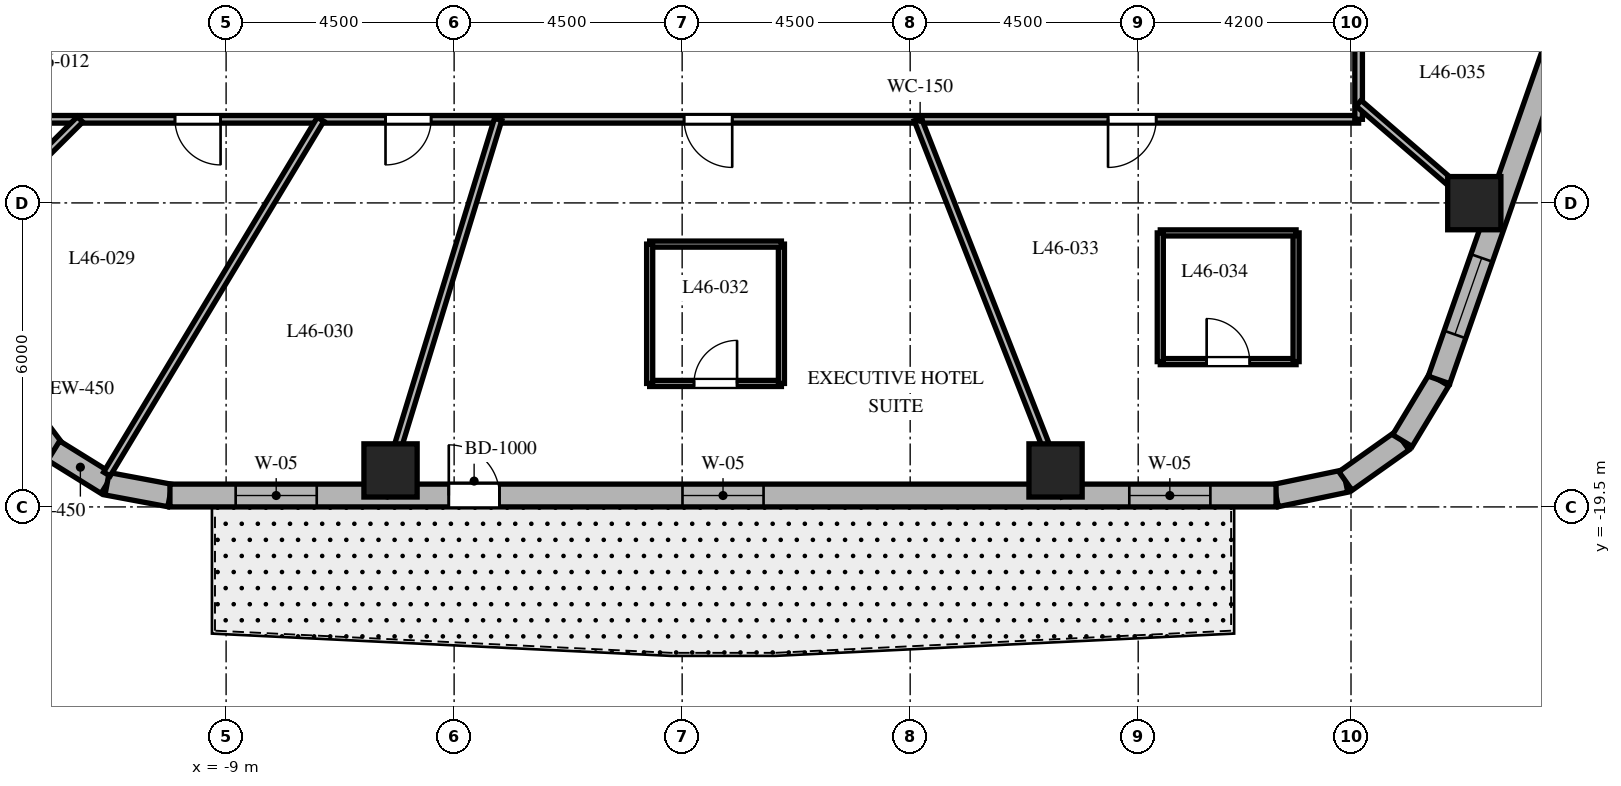
"""IFC4 building model, lengths in metres.
Left out: names, types, materials, properties, quantities, classifications, styles, units other than length and angle.
Written with IfcOpenShell. Run it as: python <this file> out.ifc"""

import sys

from ifc_helpers import new_model, si_unit, direction, frame, frame_2d, origin, origin_2d, place, context, subcontext, project, spatial, rectangle, extrude, element, fill, save


model = new_model("IFC4")
c1 = context("Model", 3, precision=1e-05, world=origin(), true_north=direction((0.0, 1.0)))
c2 = subcontext(c1, "Body", "Model", "MODEL_VIEW")
j1 = project(units=[si_unit("LENGTHUNIT", "METRE"), si_unit("PLANEANGLEUNIT", "RADIAN")], contexts=[c1])
p1 = place(None, origin())
s1 = spatial("IfcSite", under=j1, at=p1, CompositionType="ELEMENT")
p2 = place(p1, origin())
s2 = spatial("IfcBuilding", under=s1, at=p2, CompositionType="ELEMENT")
p3 = place(p2, frame((0.0, 0.0, 186.7)))
s3 = spatial("IfcBuildingStorey", under=s2, at=p3, CompositionType="ELEMENT", Elevation=186.7)
for number, where, z_axis, x_axis in (
    (1, (-5.755, -18.78, 0.0), (0.0, 0.0, 1.0), (1.0, 0.0, 0.0)),
    (2, (7.369, -18.78, 0.0), (0.0, 0.0, 1.0), (1.0, 0.0, 0.0)),
    (3, (15.633, -13.505, 0.0), (0.0, 0.0, 1.0), (1.0, 0.0, 0.0)),
):
    element("IfcColumn", number, at=place(p3, frame(where, z_axis=z_axis, x_axis=x_axis)), inside=s3, PredefinedType="COLUMN", context=c2, shape_type="SweptSolid", body=[
        extrude(rectangle(XDim=1.05, YDim=1.05, at=origin_2d()), origin(), (0.0, 0.0, 1.0), 3.7),
    ])
p4 = place(p3, frame((-13.162, -17.381, 0.0), z_axis=(0.0, 0.0, 1.0), x_axis=(0.601515770517, -0.798860925205, 0.0)))
e4 = element("IfcWall", 4, at=p4, inside=s3, PredefinedType="SOLIDWALL", context=c2, shape_type="SweptSolid", body=[
    extrude(rectangle(XDim=1.262, YDim=0.45, at=frame_2d((0.631, 0.0))), origin(), (0.0, 0.0, 1.0), 3.4),
])
p5 = place(p3, frame((-12.403, -18.389, 0.0), z_axis=(0.0, 0.0, 1.0), x_axis=(0.849795170926, -0.527113049991, 0.0)))
e5 = element("IfcWall", 5, at=p5, inside=s3, PredefinedType="SOLIDWALL", context=c2, shape_type="SweptSolid", body=[
    extrude(rectangle(XDim=1.241, YDim=0.45, at=frame_2d((0.62, 0.0))), origin(), (0.0, 0.0, 1.0), 3.4),
])
p6 = place(p3, frame((-11.349, -19.043, 0.0), z_axis=(0.0, 0.0, 1.0), x_axis=(0.982931267051, -0.183973161772, 0.0)))
e6 = element("IfcWall", 6, at=p6, inside=s3, PredefinedType="SOLIDWALL", context=c2, shape_type="SweptSolid", body=[
    extrude(rectangle(XDim=1.262, YDim=0.45, at=frame_2d((0.631, 0.0))), origin(), (0.0, 0.0, 1.0), 3.4),
])
p7 = place(p3, frame((11.72, -19.275, 0.0), z_axis=(0.0, 0.0, 1.0), x_axis=(0.97893106758, 0.204191001093, 0.0)))
e7 = element("IfcWall", 7, at=p7, inside=s3, PredefinedType="SOLIDWALL", context=c2, shape_type="SweptSolid", body=[
    extrude(rectangle(XDim=1.4, YDim=0.45, at=frame_2d((0.7, 0.0))), origin(), (0.0, 0.0, 1.0), 3.4),
])
p8 = place(p3, frame((13.091, -18.989, 0.0), z_axis=(0.0, 0.0, 1.0), x_axis=(0.815574637848, 0.578651890258, 0.0)))
e8 = element("IfcWall", 8, at=p8, inside=s3, PredefinedType="SOLIDWALL", context=c2, shape_type="SweptSolid", body=[
    extrude(rectangle(XDim=1.377, YDim=0.45, at=frame_2d((0.688, 0.0))), origin(), (0.0, 0.0, 1.0), 3.4),
])
p9 = place(p3, frame((14.214, -18.192, 0.0), z_axis=(0.0, 0.0, 1.0), x_axis=(0.516340945502, 0.856383108193, 0.0)))
e9 = element("IfcWall", 9, at=p9, inside=s3, PredefinedType="SOLIDWALL", context=c2, shape_type="SweptSolid", body=[
    extrude(rectangle(XDim=1.4, YDim=0.45, at=frame_2d((0.7, 0.0))), origin(), (0.0, 0.0, 1.0), 3.4),
])
p10 = place(p3, frame((-10.108, -19.275, 0.0), z_axis=(0.0, 0.0, 1.0), x_axis=(1.0, 0.0, 0.0)))
e10 = element("IfcWall", 10, at=p10, inside=s3, PredefinedType="SOLIDWALL", context=c2, shape_type="SweptSolid", body=[
    extrude(rectangle(XDim=21.829, YDim=0.45, at=frame_2d((10.915, 0.0))), origin(), (0.0, 0.0, 1.0), 3.4),
])
p11 = place(p10, frame((5.503, 0.0, 0.0)))
e11 = element("IfcOpeningElement", 11, at=p11, cuts=e10, PredefinedType="OPENING", context=c2, shape_type="SweptSolid", body=[
    extrude(rectangle(XDim=1.0, YDim=2.15, at=frame_2d((0.5, 1.075))), frame((0.0, 0.235, 0.0), z_axis=(0.0, -1.0, 0.0), x_axis=(1.0, 0.0, 0.0)), (0.0, 0.0, 1.0), 0.47),
])
p12 = place(p10, frame((1.297, 0.0, 0.8)))
e12 = element("IfcOpeningElement", 12, at=p12, cuts=e10, PredefinedType="OPENING", context=c2, shape_type="SweptSolid", body=[
    extrude(rectangle(XDim=1.6, YDim=1.75, at=frame_2d((0.8, 0.875))), frame((0.0, 0.235, 0.0), z_axis=(0.0, -1.0, 0.0), x_axis=(1.0, 0.0, 0.0)), (0.0, 0.0, 1.0), 0.47),
])
p13 = place(p10, frame((10.115, 0.0, 0.8)))
e13 = element("IfcOpeningElement", 13, at=p13, cuts=e10, PredefinedType="OPENING", context=c2, shape_type="SweptSolid", body=[
    extrude(rectangle(XDim=1.6, YDim=1.75, at=frame_2d((0.8, 0.875))), frame((0.0, 0.235, 0.0), z_axis=(0.0, -1.0, 0.0), x_axis=(1.0, 0.0, 0.0)), (0.0, 0.0, 1.0), 0.47),
])
p14 = place(p10, frame((18.933, 0.0, 0.8)))
e14 = element("IfcOpeningElement", 14, at=p14, cuts=e10, PredefinedType="OPENING", context=c2, shape_type="SweptSolid", body=[
    extrude(rectangle(XDim=1.6, YDim=1.75, at=frame_2d((0.8, 0.875))), frame((0.0, 0.235, 0.0), z_axis=(0.0, -1.0, 0.0), x_axis=(1.0, 0.0, 0.0)), (0.0, 0.0, 1.0), 0.47),
])
p15 = place(p3, frame((14.937, -16.993, 0.0), z_axis=(0.0, 0.0, 1.0), x_axis=(0.330431575061, 0.943829949834, 0.0)))
e15 = element("IfcWall", 15, at=p15, inside=s3, PredefinedType="SOLIDWALL", context=c2, shape_type="SweptSolid", body=[
    extrude(rectangle(XDim=17.689, YDim=0.45, at=frame_2d((8.844, 0.0))), origin(), (0.0, 0.0, 1.0), 3.4),
])
p16 = place(p15, frame((0.95, 0.0, 0.8)))
e16 = element("IfcOpeningElement", 16, at=p16, cuts=e15, PredefinedType="OPENING", context=c2, shape_type="SweptSolid", body=[
    extrude(rectangle(XDim=1.6, YDim=1.75, at=frame_2d((0.8, 0.875))), frame((0.0, 0.235, 0.0), z_axis=(0.0, -1.0, 0.0), x_axis=(1.0, 0.0, 0.0)), (0.0, 0.0, 1.0), 0.47),
])
p17 = place(p15, frame((7.99, 0.0, 0.8)))
e17 = element("IfcOpeningElement", 17, at=p17, cuts=e15, PredefinedType="OPENING", context=c2, shape_type="SweptSolid", body=[
    extrude(rectangle(XDim=1.6, YDim=1.75, at=frame_2d((0.8, 0.875))), frame((0.0, 0.235, 0.0), z_axis=(0.0, -1.0, 0.0), x_axis=(1.0, 0.0, 0.0)), (0.0, 0.0, 1.0), 0.47),
])
p18 = place(p15, frame((15.084, 0.0, 0.8)))
e18 = element("IfcOpeningElement", 18, at=p18, cuts=e15, PredefinedType="OPENING", context=c2, shape_type="SweptSolid", body=[
    extrude(rectangle(XDim=1.6, YDim=1.75, at=frame_2d((0.8, 0.875))), frame((0.0, 0.235, 0.0), z_axis=(0.0, -1.0, 0.0), x_axis=(1.0, 0.0, 0.0)), (0.0, 0.0, 1.0), 0.47),
])
p19 = place(p3, frame((13.35, -11.85, 0.0), z_axis=(0.0, 0.0, 1.0), x_axis=(-1.0, 0.0, 0.0)))
e19 = element("IfcWall", 19, at=p19, inside=s3, PredefinedType="PARTITIONING", context=c2, shape_type="SweptSolid", body=[
    extrude(rectangle(XDim=26.7, YDim=0.15, at=frame_2d((13.35, 0.0))), origin(), (0.0, 0.0, 1.0), 2.84),
])
p20 = place(p19, frame((22.459, 0.0, 0.0)))
e20 = element("IfcOpeningElement", 20, at=p20, cuts=e19, PredefinedType="OPENING", context=c2, shape_type="SweptSolid", body=[
    extrude(rectangle(XDim=0.9, YDim=2.03, at=frame_2d((0.45, 1.015))), frame((0.0, 0.085, 0.0), z_axis=(0.0, -1.0, 0.0), x_axis=(1.0, 0.0, 0.0)), (0.0, 0.0, 1.0), 0.17),
])
p21 = place(p19, frame((18.304, 0.0, 0.0)))
e21 = element("IfcOpeningElement", 21, at=p21, cuts=e19, PredefinedType="OPENING", context=c2, shape_type="SweptSolid", body=[
    extrude(rectangle(XDim=0.9, YDim=2.03, at=frame_2d((0.45, 1.015))), frame((0.0, 0.085, 0.0), z_axis=(0.0, -1.0, 0.0), x_axis=(1.0, 0.0, 0.0)), (0.0, 0.0, 1.0), 0.17),
])
p22 = place(p19, frame((12.362, 0.0, 0.0)))
e22 = element("IfcOpeningElement", 22, at=p22, cuts=e19, PredefinedType="OPENING", context=c2, shape_type="SweptSolid", body=[
    extrude(rectangle(XDim=0.95, YDim=2.03, at=frame_2d((0.475, 1.015))), frame((0.0, 0.085, 0.0), z_axis=(0.0, -1.0, 0.0), x_axis=(1.0, 0.0, 0.0)), (0.0, 0.0, 1.0), 0.17),
])
p23 = place(p19, frame((3.995, 0.0, 0.0)))
e23 = element("IfcOpeningElement", 23, at=p23, cuts=e19, PredefinedType="OPENING", context=c2, shape_type="SweptSolid", body=[
    extrude(rectangle(XDim=0.95, YDim=2.03, at=frame_2d((0.475, 1.015))), frame((0.0, 0.085, 0.0), z_axis=(0.0, -1.0, 0.0), x_axis=(1.0, 0.0, 0.0)), (0.0, 0.0, 1.0), 0.17),
])
p24 = place(p3, frame((13.35, 11.85, 0.0), z_axis=(0.0, 0.0, 1.0), x_axis=(0.0, -1.0, 0.0)))
e24 = element("IfcWall", 24, at=p24, inside=s3, PredefinedType="PARTITIONING", context=c2, shape_type="SweptSolid", body=[
    extrude(rectangle(XDim=23.7, YDim=0.15, at=frame_2d((11.85, 0.0))), origin(), (0.0, 0.0, 1.0), 2.84),
])
p25 = place(p24, frame((5.951, 0.0, 0.0)))
e25 = element("IfcOpeningElement", 25, at=p25, cuts=e24, PredefinedType="OPENING", context=c2, shape_type="SweptSolid", body=[
    extrude(rectangle(XDim=0.9, YDim=2.03, at=frame_2d((0.45, 1.015))), frame((0.0, 0.085, 0.0), z_axis=(0.0, -1.0, 0.0), x_axis=(1.0, 0.0, 0.0)), (0.0, 0.0, 1.0), 0.17),
])
p26 = place(p24, frame((1.993, 0.0, 0.0)))
e26 = element("IfcOpeningElement", 26, at=p26, cuts=e24, PredefinedType="OPENING", context=c2, shape_type="SweptSolid", body=[
    extrude(rectangle(XDim=0.9, YDim=2.03, at=frame_2d((0.45, 1.015))), frame((0.0, 0.085, 0.0), z_axis=(0.0, -1.0, 0.0), x_axis=(1.0, 0.0, 0.0)), (0.0, 0.0, 1.0), 0.17),
])
p27 = place(p24, frame((18.364, 0.0, 0.0)))
e27 = element("IfcOpeningElement", 27, at=p27, cuts=e24, PredefinedType="OPENING", context=c2, shape_type="SweptSolid", body=[
    extrude(rectangle(XDim=1.0, YDim=2.03, at=frame_2d((0.5, 1.015))), frame((0.0, 0.085, 0.0), z_axis=(0.0, -1.0, 0.0), x_axis=(1.0, 0.0, 0.0)), (0.0, 0.0, 1.0), 0.17),
])
p28 = place(p3, frame((-11.882, -11.85, 0.0), z_axis=(0.0, 0.0, 1.0), x_axis=(-0.708037373639, -0.706174962407, 0.0)))
e28 = element("IfcWall", 28, at=p28, inside=s3, PredefinedType="PARTITIONING", context=c2, shape_type="SweptSolid", body=[
    extrude(rectangle(XDim=3.802, YDim=0.15, at=frame_2d((1.901, 0.0))), origin(), (0.0, 0.0, 1.0), 2.64),
])
p29 = place(p3, frame((-7.136, -11.85, 0.0), z_axis=(0.0, 0.0, 1.0), x_axis=(-0.515900673207, -0.856648408266, 0.0)))
e29 = element("IfcWall", 29, at=p29, inside=s3, PredefinedType="PARTITIONING", context=c2, shape_type="SweptSolid", body=[
    extrude(rectangle(XDim=8.174, YDim=0.15, at=frame_2d((4.087, 0.0))), origin(), (0.0, 0.0, 1.0), 2.64),
])
p30 = place(p3, frame((-3.631, -11.85, 0.0), z_axis=(0.0, 0.0, 1.0), x_axis=(-0.293007573338, -0.956110120209, 0.0)))
e30 = element("IfcWall", 30, at=p30, inside=s3, PredefinedType="PARTITIONING", context=c2, shape_type="SweptSolid", body=[
    extrude(rectangle(XDim=7.766, YDim=0.15, at=frame_2d((3.883, 0.0))), origin(), (0.0, 0.0, 1.0), 2.64),
])
p31 = place(p3, frame((4.65, -11.85, 0.0), z_axis=(0.0, 0.0, 1.0), x_axis=(0.365265947993, -0.930903210456, 0.0)))
e31 = element("IfcWall", 31, at=p31, inside=s3, PredefinedType="PARTITIONING", context=c2, shape_type="SweptSolid", body=[
    extrude(rectangle(XDim=7.976, YDim=0.15, at=frame_2d((3.988, 0.0))), origin(), (0.0, 0.0, 1.0), 2.64),
])
p32 = place(p3, frame((13.35, -11.533, 0.0), z_axis=(0.0, 0.0, 1.0), x_axis=(0.756711647314, -0.65374879183, 0.0)))
e32 = element("IfcWall", 32, at=p32, inside=s3, PredefinedType="PARTITIONING", context=c2, shape_type="SweptSolid", body=[
    extrude(rectangle(XDim=3.55, YDim=0.15, at=frame_2d((1.775, 0.0))), origin(), (0.0, 0.0, 1.0), 2.64),
])
p33 = place(p3, frame((-0.641, -17.063, 0.0), z_axis=(0.0, 0.0, 1.0), x_axis=(1.0, 0.0, 0.0)))
e33 = element("IfcWall", 33, at=p33, inside=s3, PredefinedType="PARTITIONING", context=c2, shape_type="SweptSolid", body=[
    extrude(rectangle(XDim=2.6, YDim=0.12, at=frame_2d((1.3, 0.0))), origin(), (0.0, 0.0, 1.0), 3.4),
])
p34 = place(p33, frame((0.875, 0.0, 0.0)))
e34 = element("IfcOpeningElement", 34, at=p34, cuts=e33, PredefinedType="OPENING", context=c2, shape_type="SweptSolid", body=[
    extrude(rectangle(XDim=0.85, YDim=2.03, at=frame_2d((0.425, 1.015))), frame((0.0, 0.07, 0.0), z_axis=(0.0, -1.0, 0.0), x_axis=(1.0, 0.0, 0.0)), (0.0, 0.0, 1.0), 0.14),
])
p35 = place(p3, frame((1.959, -17.063, 0.0), z_axis=(0.0, 0.0, 1.0), x_axis=(0.0, 1.0, 0.0)))
e35 = element("IfcWall", 35, at=p35, inside=s3, PredefinedType="PARTITIONING", context=c2, shape_type="SweptSolid", body=[
    extrude(rectangle(XDim=2.75, YDim=0.12, at=frame_2d((1.375, 0.0))), origin(), (0.0, 0.0, 1.0), 2.84),
])
p36 = place(p3, frame((1.959, -14.313, 0.0), z_axis=(0.0, 0.0, 1.0), x_axis=(-1.0, 0.0, 0.0)))
e36 = element("IfcWall", 36, at=p36, inside=s3, PredefinedType="PARTITIONING", context=c2, shape_type="SweptSolid", body=[
    extrude(rectangle(XDim=2.6, YDim=0.12, at=frame_2d((1.3, 0.0))), origin(), (0.0, 0.0, 1.0), 3.4),
])
p37 = place(p3, frame((-0.641, -14.313, 0.0), z_axis=(0.0, 0.0, 1.0), x_axis=(0.0, -1.0, 0.0)))
e37 = element("IfcWall", 37, at=p37, inside=s3, PredefinedType="PARTITIONING", context=c2, shape_type="SweptSolid", body=[
    extrude(rectangle(XDim=2.75, YDim=0.12, at=frame_2d((1.375, 0.0))), origin(), (0.0, 0.0, 1.0), 2.84),
])
p38 = place(p3, frame((9.436, -16.632, 0.0), z_axis=(0.0, 0.0, 1.0), x_axis=(1.0, 0.0, 0.0)))
e38 = element("IfcWall", 38, at=p38, inside=s3, PredefinedType="PARTITIONING", context=c2, shape_type="SweptSolid", body=[
    extrude(rectangle(XDim=2.68, YDim=0.12, at=frame_2d((1.34, 0.0))), origin(), (0.0, 0.0, 1.0), 2.64),
])
p39 = place(p38, frame((0.915, 0.0, 0.0)))
e39 = element("IfcOpeningElement", 39, at=p39, cuts=e38, PredefinedType="OPENING", context=c2, shape_type="SweptSolid", body=[
    extrude(rectangle(XDim=0.85, YDim=2.03, at=frame_2d((0.425, 1.015))), frame((0.0, 0.07, 0.0), z_axis=(0.0, -1.0, 0.0), x_axis=(1.0, 0.0, 0.0)), (0.0, 0.0, 1.0), 0.14),
])
p40 = place(p3, frame((12.116, -16.632, 0.0), z_axis=(0.0, 0.0, 1.0), x_axis=(0.0, 1.0, 0.0)))
e40 = element("IfcWall", 40, at=p40, inside=s3, PredefinedType="PARTITIONING", context=c2, shape_type="SweptSolid", body=[
    extrude(rectangle(XDim=2.54, YDim=0.12, at=frame_2d((1.27, 0.0))), origin(), (0.0, 0.0, 1.0), 2.64),
])
p41 = place(p3, frame((12.116, -14.092, 0.0), z_axis=(0.0, 0.0, 1.0), x_axis=(-1.0, 0.0, 0.0)))
e41 = element("IfcWall", 41, at=p41, inside=s3, PredefinedType="PARTITIONING", context=c2, shape_type="SweptSolid", body=[
    extrude(rectangle(XDim=2.68, YDim=0.12, at=frame_2d((1.34, 0.0))), origin(), (0.0, 0.0, 1.0), 2.927),
])
p42 = place(p3, frame((9.436, -14.092, 0.0), z_axis=(0.0, 0.0, 1.0), x_axis=(0.0, -1.0, 0.0)))
e42 = element("IfcWall", 42, at=p42, inside=s3, PredefinedType="PARTITIONING", context=c2, shape_type="SweptSolid", body=[
    extrude(rectangle(XDim=2.54, YDim=0.12, at=frame_2d((1.27, 0.0))), origin(), (0.0, 0.0, 1.0), 2.927),
])
p43 = place(p11, origin())
e43 = element("IfcDoor", 43, at=p43, inside=s3, OperationType="SINGLE_SWING_LEFT", PredefinedType="DOOR", context=c2, shape_type="SweptSolid", body=[
    extrude(rectangle(XDim=1.0, YDim=2.15, at=frame_2d((0.5, 1.075))), frame((0.0, 0.025, 0.0), z_axis=(0.0, -1.0, 0.0), x_axis=(1.0, 0.0, 0.0)), (0.0, 0.0, 1.0), 0.05),
])
fill(e11, e43)
p44 = place(p12, origin())
e44 = element("IfcWindow", 44, at=p44, inside=s3, PartitioningType="SINGLE_PANEL", PredefinedType="WINDOW", context=c2, shape_type="SweptSolid", body=[
    extrude(rectangle(XDim=1.6, YDim=1.75, at=frame_2d((0.8, 0.875))), frame((0.0, 0.03, 0.0), z_axis=(0.0, -1.0, 0.0), x_axis=(1.0, 0.0, 0.0)), (0.0, 0.0, 1.0), 0.06),
])
fill(e12, e44)
p45 = place(p13, origin())
e45 = element("IfcWindow", 45, at=p45, inside=s3, PartitioningType="SINGLE_PANEL", PredefinedType="WINDOW", context=c2, shape_type="SweptSolid", body=[
    extrude(rectangle(XDim=1.6, YDim=1.75, at=frame_2d((0.8, 0.875))), frame((0.0, 0.03, 0.0), z_axis=(0.0, -1.0, 0.0), x_axis=(1.0, 0.0, 0.0)), (0.0, 0.0, 1.0), 0.06),
])
fill(e13, e45)
p46 = place(p14, origin())
e46 = element("IfcWindow", 46, at=p46, inside=s3, PartitioningType="SINGLE_PANEL", PredefinedType="WINDOW", context=c2, shape_type="SweptSolid", body=[
    extrude(rectangle(XDim=1.6, YDim=1.75, at=frame_2d((0.8, 0.875))), frame((0.0, 0.03, 0.0), z_axis=(0.0, -1.0, 0.0), x_axis=(1.0, 0.0, 0.0)), (0.0, 0.0, 1.0), 0.06),
])
fill(e14, e46)
p47 = place(p16, origin())
e47 = element("IfcWindow", 47, at=p47, inside=s3, PartitioningType="SINGLE_PANEL", PredefinedType="WINDOW", context=c2, shape_type="SweptSolid", body=[
    extrude(rectangle(XDim=1.6, YDim=1.75, at=frame_2d((0.8, 0.875))), frame((0.0, 0.03, 0.0), z_axis=(0.0, -1.0, 0.0), x_axis=(1.0, 0.0, 0.0)), (0.0, 0.0, 1.0), 0.06),
])
fill(e16, e47)
p48 = place(p20, origin())
e48 = element("IfcDoor", 48, at=p48, inside=s3, OperationType="SINGLE_SWING_LEFT", PredefinedType="DOOR", context=c2, shape_type="SweptSolid", body=[
    extrude(rectangle(XDim=0.9, YDim=2.03, at=frame_2d((0.45, 1.015))), frame((0.0, 0.025, 0.0), z_axis=(0.0, -1.0, 0.0), x_axis=(1.0, 0.0, 0.0)), (0.0, 0.0, 1.0), 0.05),
])
fill(e20, e48)
p49 = place(p21, origin())
e49 = element("IfcDoor", 49, at=p49, inside=s3, OperationType="SINGLE_SWING_RIGHT", PredefinedType="DOOR", context=c2, shape_type="SweptSolid", body=[
    extrude(rectangle(XDim=0.9, YDim=2.03, at=frame_2d((0.45, 1.015))), frame((0.0, 0.025, 0.0), z_axis=(0.0, -1.0, 0.0), x_axis=(1.0, 0.0, 0.0)), (0.0, 0.0, 1.0), 0.05),
])
fill(e21, e49)
p50 = place(p22, origin())
e50 = element("IfcDoor", 50, at=p50, inside=s3, OperationType="SINGLE_SWING_LEFT", PredefinedType="DOOR", context=c2, shape_type="SweptSolid", body=[
    extrude(rectangle(XDim=0.95, YDim=2.03, at=frame_2d((0.475, 1.015))), frame((0.0, 0.025, 0.0), z_axis=(0.0, -1.0, 0.0), x_axis=(1.0, 0.0, 0.0)), (0.0, 0.0, 1.0), 0.05),
])
fill(e22, e50)
p51 = place(p34, origin())
e51 = element("IfcDoor", 51, at=p51, inside=s3, OperationType="SINGLE_SWING_RIGHT", PredefinedType="DOOR", context=c2, shape_type="SweptSolid", body=[
    extrude(rectangle(XDim=0.85, YDim=2.03, at=frame_2d((0.425, 1.015))), frame((0.0, 0.025, 0.0), z_axis=(0.0, -1.0, 0.0), x_axis=(1.0, 0.0, 0.0)), (0.0, 0.0, 1.0), 0.05),
])
fill(e34, e51)
p52 = place(p23, origin())
e52 = element("IfcDoor", 52, at=p52, inside=s3, OperationType="SINGLE_SWING_RIGHT", PredefinedType="DOOR", context=c2, shape_type="SweptSolid", body=[
    extrude(rectangle(XDim=0.95, YDim=2.03, at=frame_2d((0.475, 1.015))), frame((0.0, 0.025, 0.0), z_axis=(0.0, -1.0, 0.0), x_axis=(1.0, 0.0, 0.0)), (0.0, 0.0, 1.0), 0.05),
])
fill(e23, e52)
p53 = place(p39, origin())
e53 = element("IfcDoor", 53, at=p53, inside=s3, OperationType="SINGLE_SWING_LEFT", PredefinedType="DOOR", context=c2, shape_type="SweptSolid", body=[
    extrude(rectangle(XDim=0.85, YDim=2.03, at=frame_2d((0.425, 1.015))), frame((0.0, 0.025, 0.0), z_axis=(0.0, -1.0, 0.0), x_axis=(1.0, 0.0, 0.0)), (0.0, 0.0, 1.0), 0.05),
])
fill(e39, e53)
save(model, sys.argv[1])
